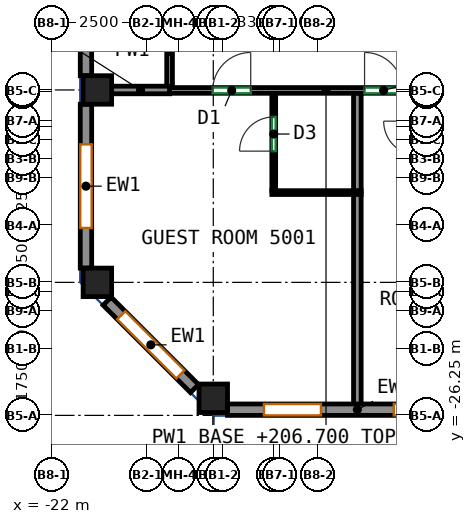
"""IFC4 building model, lengths in metres.
Left out: names, types, materials, properties, quantities, classifications, styles, units other than length and angle.
Written with IfcOpenShell. Run it as: python <this file> out.ifc"""

import sys

from ifc_helpers import new_model, si_unit, direction, frame, frame_2d, origin, origin_2d, place, context, subcontext, project, spatial, rectangle, extrude, source, transform, mapped, element, fill, save


model = new_model("IFC4")
c1 = context("Model", 3, precision=1e-05, world=origin(), true_north=direction((0.0, 1.0)))
c2 = subcontext(c1, "Body", "Model", "MODEL_VIEW")
j1 = project(units=[si_unit("LENGTHUNIT", "METRE"), si_unit("PLANEANGLEUNIT", "RADIAN")], contexts=[c1])
p1 = place(None, origin())
s1 = spatial("IfcSite", under=j1, at=p1, CompositionType="ELEMENT")
p2 = place(p1, origin())
s2 = spatial("IfcBuilding", under=s1, at=p2, CompositionType="ELEMENT")
p3 = place(p2, frame((0.0, 0.0, 206.7)))
s3 = spatial("IfcBuildingStorey", under=s2, at=p3, CompositionType="ELEMENT", Elevation=206.7)
m1 = source(origin(), c2, "Body", "SweptSolid", [
    extrude(rectangle(XDim=0.75, YDim=0.75, at=origin_2d()), origin(), (0.0, 0.0, 1.0), 3.12),
])
for number, where, z_axis, x_axis in (
    (1, (-20.8, -22.75, 0.0), (0.0, 0.0, 1.0), (1.0, 0.0, 0.0)),
    (2, (-20.8, -17.688, 0.0), (0.0, 0.0, 1.0), (1.0, 0.0, 0.0)),
    (3, (-17.75, -25.8, 0.0), (0.0, 0.0, 1.0), (1.0, 0.0, 0.0)),
):
    element("IfcColumn", number, at=place(p3, frame(where, z_axis=z_axis, x_axis=x_axis)), inside=s3, PredefinedType="COLUMN", context=c2, shape_type="MappedRepresentation", body=[
        mapped(m1, transform((0.0, 0.0, 0.0))),
    ])
m2 = source(origin(), c2, "Body", "SweptSolid", [
    extrude(rectangle(XDim=6.833, YDim=0.3, at=frame_2d((3.417, 0.0))), origin(), (0.0, 0.0, 1.0), 3.12),
])
p4 = place(p3, frame((-17.375, -26.1, 0.0), z_axis=(0.0, 0.0, 1.0), x_axis=(1.0, 0.0, 0.0)))
e4 = element("IfcWall", 4, at=p4, inside=s3, PredefinedType="SOLIDWALL", context=c2, shape_type="MappedRepresentation", body=[
    mapped(m2, transform((0.0, 0.0, 0.0))),
])
p5 = place(p4, frame((0.958, 0.0, 0.85)))
e5 = element("IfcOpeningElement", 5, at=p5, cuts=e4, PredefinedType="OPENING", context=c2, shape_type="SweptSolid", body=[
    extrude(rectangle(XDim=1.5, YDim=1.95, at=frame_2d((0.75, 0.975))), frame((0.0, 0.16, 0.0), z_axis=(0.0, -1.0, 0.0), x_axis=(1.0, 0.0, 0.0)), (0.0, 0.0, 1.0), 0.32),
])
p6 = place(p4, frame((4.375, 0.0, 0.85)))
e6 = element("IfcOpeningElement", 6, at=p6, cuts=e4, PredefinedType="OPENING", context=c2, shape_type="SweptSolid", body=[
    extrude(rectangle(XDim=1.5, YDim=1.95, at=frame_2d((0.75, 0.975))), frame((0.0, 0.16, 0.0), z_axis=(0.0, -1.0, 0.0), x_axis=(1.0, 0.0, 0.0)), (0.0, 0.0, 1.0), 0.32),
])
m3 = source(origin(), c2, "Body", "SweptSolid", [
    extrude(rectangle(XDim=7.812, YDim=0.3, at=frame_2d((3.906, 0.0))), origin(), (0.0, 0.0, 1.0), 3.12),
])
p7 = place(p3, frame((-21.1, -9.5, 0.0), z_axis=(0.0, 0.0, 1.0), x_axis=(0.0, -1.0, 0.0)))
e7 = element("IfcWall", 7, at=p7, inside=s3, PredefinedType="SOLIDWALL", context=c2, shape_type="MappedRepresentation", body=[
    mapped(m3, transform((0.0, 0.0, 0.0))),
])
p8 = place(p7, frame((0.853, 0.0, 0.85)))
e8 = element("IfcOpeningElement", 8, at=p8, cuts=e7, PredefinedType="OPENING", context=c2, shape_type="SweptSolid", body=[
    extrude(rectangle(XDim=2.2, YDim=1.95, at=frame_2d((1.1, 0.975))), frame((0.0, 0.16, 0.0), z_axis=(0.0, -1.0, 0.0), x_axis=(1.0, 0.0, 0.0)), (0.0, 0.0, 1.0), 0.32),
])
p9 = place(p7, frame((4.759, 0.0, 0.85)))
e9 = element("IfcOpeningElement", 9, at=p9, cuts=e7, PredefinedType="OPENING", context=c2, shape_type="SweptSolid", body=[
    extrude(rectangle(XDim=2.2, YDim=1.95, at=frame_2d((1.1, 0.975))), frame((0.0, 0.16, 0.0), z_axis=(0.0, -1.0, 0.0), x_axis=(1.0, 0.0, 0.0)), (0.0, 0.0, 1.0), 0.32),
])
m4 = source(origin(), c2, "Body", "SweptSolid", [
    extrude(rectangle(XDim=4.312, YDim=0.3, at=frame_2d((2.156, 0.0))), origin(), (0.0, 0.0, 1.0), 3.12),
])
p10 = place(p3, frame((-21.1, -18.062, 0.0), z_axis=(0.0, 0.0, 1.0), x_axis=(0.0, -1.0, 0.0)))
e10 = element("IfcWall", 10, at=p10, inside=s3, PredefinedType="SOLIDWALL", context=c2, shape_type="MappedRepresentation", body=[
    mapped(m4, transform((0.0, 0.0, 0.0))),
])
p11 = place(p10, frame((1.056, 0.0, 0.85)))
e11 = element("IfcOpeningElement", 11, at=p11, cuts=e10, PredefinedType="OPENING", context=c2, shape_type="SweptSolid", body=[
    extrude(rectangle(XDim=2.2, YDim=1.95, at=frame_2d((1.1, 0.975))), frame((0.0, 0.16, 0.0), z_axis=(0.0, -1.0, 0.0), x_axis=(1.0, 0.0, 0.0)), (0.0, 0.0, 1.0), 0.32),
])
m5 = source(origin(), c2, "Body", "SweptSolid", [
    extrude(rectangle(XDim=3.253, YDim=0.3, at=frame_2d((1.626, 0.0))), origin(), (0.0, 0.0, 1.0), 3.12),
])
p12 = place(p3, frame((-20.544, -23.244, 0.0), z_axis=(0.0, 0.0, 1.0), x_axis=(0.707106781187, -0.707106781187, 0.0)))
e12 = element("IfcWall", 12, at=p12, inside=s3, PredefinedType="SOLIDWALL", context=c2, shape_type="MappedRepresentation", body=[
    mapped(m5, transform((0.0, 0.0, 0.0))),
])
p13 = place(p12, frame((0.526, 0.0, 0.85)))
e13 = element("IfcOpeningElement", 13, at=p13, cuts=e12, PredefinedType="OPENING", context=c2, shape_type="SweptSolid", body=[
    extrude(rectangle(XDim=2.2, YDim=1.95, at=frame_2d((1.1, 0.975))), frame((0.0, 0.16, 0.0), z_axis=(0.0, -1.0, 0.0), x_axis=(1.0, 0.0, 0.0)), (0.0, 0.0, 1.0), 0.32),
])
p14 = place(p3, frame((-18.9, -17.7, 0.0), z_axis=(0.0, 0.0, 1.0), x_axis=(1.0, 0.0, 0.0)))
e14 = element("IfcWall", 14, at=p14, inside=s3, PredefinedType="PARTITIONING", context=c2, shape_type="SweptSolid", body=[
    extrude(rectangle(XDim=8.233, YDim=0.15, at=frame_2d((4.116, 0.0))), origin(), (0.0, 0.0, 1.0), 2.52),
])
p15 = place(p14, frame((1.135, 0.0, 0.0)))
e15 = element("IfcOpeningElement", 15, at=p15, cuts=e14, PredefinedType="OPENING", context=c2, shape_type="SweptSolid", body=[
    extrude(rectangle(XDim=1.0, YDim=2.1, at=frame_2d((0.5, 1.05))), frame((0.0, 0.085, 0.0), z_axis=(0.0, -1.0, 0.0), x_axis=(1.0, 0.0, 0.0)), (0.0, 0.0, 1.0), 0.17),
])
p16 = place(p14, frame((5.131, 0.0, 0.0)))
e16 = element("IfcOpeningElement", 16, at=p16, cuts=e14, PredefinedType="OPENING", context=c2, shape_type="SweptSolid", body=[
    extrude(rectangle(XDim=1.0, YDim=2.1, at=frame_2d((0.5, 1.05))), frame((0.0, 0.085, 0.0), z_axis=(0.0, -1.0, 0.0), x_axis=(1.0, 0.0, 0.0)), (0.0, 0.0, 1.0), 0.17),
])
p17 = place(p3, frame((-18.9, -17.598, 0.0), z_axis=(0.0, 0.0, 1.0), x_axis=(0.0, 1.0, 0.0)))
e17 = element("IfcWall", 17, at=p17, inside=s3, PredefinedType="PARTITIONING", context=c2, shape_type="SweptSolid", body=[
    extrude(rectangle(XDim=1.855, YDim=0.15, at=frame_2d((0.927, 0.0))), origin(), (0.0, 0.0, 1.0), 3.12),
])
p18 = place(p3, frame((-16.159, -20.338, 0.0), z_axis=(0.0, 0.0, 1.0), x_axis=(0.0, 1.0, 0.0)))
e18 = element("IfcWall", 18, at=p18, inside=s3, PredefinedType="PARTITIONING", context=c2, shape_type="SweptSolid", body=[
    extrude(rectangle(XDim=2.561, YDim=0.1, at=frame_2d((1.28, 0.0))), origin(), (0.0, 0.0, 1.0), 3.12),
])
p19 = place(p18, frame((1.041, 0.0, 0.0)))
e19 = element("IfcOpeningElement", 19, at=p19, cuts=e18, PredefinedType="OPENING", context=c2, shape_type="SweptSolid", body=[
    extrude(rectangle(XDim=0.9, YDim=2.1, at=frame_2d((0.45, 1.05))), frame((0.0, 0.06, 0.0), z_axis=(0.0, -1.0, 0.0), x_axis=(1.0, 0.0, 0.0)), (0.0, 0.0, 1.0), 0.12),
])
p20 = place(p3, frame((-16.209, -20.388, 0.0), z_axis=(0.0, 0.0, 1.0), x_axis=(1.0, 0.0, 0.0)))
e20 = element("IfcWall", 20, at=p20, inside=s3, PredefinedType="PARTITIONING", context=c2, shape_type="SweptSolid", body=[
    extrude(rectangle(XDim=2.35, YDim=0.1, at=frame_2d((1.175, 0.0))), origin(), (0.0, 0.0, 1.0), 3.12),
])
p21 = place(p3, frame((-13.959, -26.0, 0.0), z_axis=(0.0, 0.0, 1.0), x_axis=(0.0, 1.0, 0.0)))
e21 = element("IfcWall", 21, at=p21, inside=s3, PredefinedType="PARTITIONING", context=c2, shape_type="SweptSolid", body=[
    extrude(rectangle(XDim=5.562, YDim=0.2, at=frame_2d((2.781, 0.0))), origin(), (0.0, 0.0, 1.0), 3.12),
])
p22 = place(p3, frame((-20.425, -17.688, 0.0), z_axis=(0.0, 0.0, 1.0), x_axis=(1.0, 0.0, 0.0)))
e22 = element("IfcWall", 22, at=p22, inside=s3, PredefinedType="PARTITIONING", context=c2, shape_type="SweptSolid", body=[
    extrude(rectangle(XDim=1.523, YDim=0.2, at=frame_2d((0.761, 0.0))), origin(), (0.0, 0.0, 1.0), 2.52),
])
p23 = place(p3, frame((-13.959, -20.338, 0.0), z_axis=(0.0, 0.0, 1.0), x_axis=(0.0, 1.0, 0.0)))
e23 = element("IfcWall", 23, at=p23, inside=s3, PredefinedType="PARTITIONING", context=c2, shape_type="SweptSolid", body=[
    extrude(rectangle(XDim=2.561, YDim=0.2, at=frame_2d((1.28, 0.0))), origin(), (0.0, 0.0, 1.0), 3.12),
])
p24 = place(p5, origin())
e24 = element("IfcWindow", 24, at=p24, inside=s3, PartitioningType="SINGLE_PANEL", PredefinedType="WINDOW", context=c2, shape_type="SweptSolid", body=[
    extrude(rectangle(XDim=1.5, YDim=1.95, at=frame_2d((0.75, 0.975))), frame((0.0, 0.03, 0.0), z_axis=(0.0, -1.0, 0.0), x_axis=(1.0, 0.0, 0.0)), (0.0, 0.0, 1.0), 0.06),
])
fill(e5, e24)
p25 = place(p6, origin())
e25 = element("IfcWindow", 25, at=p25, inside=s3, PartitioningType="SINGLE_PANEL", PredefinedType="WINDOW", context=c2, shape_type="SweptSolid", body=[
    extrude(rectangle(XDim=1.5, YDim=1.95, at=frame_2d((0.75, 0.975))), frame((0.0, 0.03, 0.0), z_axis=(0.0, -1.0, 0.0), x_axis=(1.0, 0.0, 0.0)), (0.0, 0.0, 1.0), 0.06),
])
fill(e6, e25)
p26 = place(p11, origin())
e26 = element("IfcWindow", 26, at=p26, inside=s3, PartitioningType="SINGLE_PANEL", PredefinedType="WINDOW", context=c2, shape_type="SweptSolid", body=[
    extrude(rectangle(XDim=2.2, YDim=1.95, at=frame_2d((1.1, 0.975))), frame((0.0, 0.03, 0.0), z_axis=(0.0, -1.0, 0.0), x_axis=(1.0, 0.0, 0.0)), (0.0, 0.0, 1.0), 0.06),
])
fill(e11, e26)
p27 = place(p13, origin())
e27 = element("IfcWindow", 27, at=p27, inside=s3, PartitioningType="SINGLE_PANEL", PredefinedType="WINDOW", context=c2, shape_type="SweptSolid", body=[
    extrude(rectangle(XDim=2.2, YDim=1.95, at=frame_2d((1.1, 0.975))), frame((0.0, 0.03, 0.0), z_axis=(0.0, -1.0, 0.0), x_axis=(1.0, 0.0, 0.0)), (0.0, 0.0, 1.0), 0.06),
])
fill(e13, e27)
p28 = place(p19, origin())
e28 = element("IfcDoor", 28, at=p28, inside=s3, OperationType="SINGLE_SWING_LEFT", PredefinedType="DOOR", context=c2, shape_type="SweptSolid", body=[
    extrude(rectangle(XDim=0.9, YDim=2.1, at=frame_2d((0.45, 1.05))), frame((0.0, 0.025, 0.0), z_axis=(0.0, -1.0, 0.0), x_axis=(1.0, 0.0, 0.0)), (0.0, 0.0, 1.0), 0.05),
])
fill(e19, e28)
p29 = place(p15, origin())
e29 = element("IfcDoor", 29, at=p29, inside=s3, OperationType="SINGLE_SWING_RIGHT", PredefinedType="DOOR", context=c2, shape_type="SweptSolid", body=[
    extrude(rectangle(XDim=1.0, YDim=2.1, at=frame_2d((0.5, 1.05))), frame((0.0, 0.025, 0.0), z_axis=(0.0, -1.0, 0.0), x_axis=(1.0, 0.0, 0.0)), (0.0, 0.0, 1.0), 0.05),
])
fill(e15, e29)
p30 = place(p16, origin())
e30 = element("IfcDoor", 30, at=p30, inside=s3, OperationType="SINGLE_SWING_LEFT", PredefinedType="DOOR", context=c2, shape_type="SweptSolid", body=[
    extrude(rectangle(XDim=1.0, YDim=2.1, at=frame_2d((0.5, 1.05))), frame((0.0, 0.025, 0.0), z_axis=(0.0, -1.0, 0.0), x_axis=(1.0, 0.0, 0.0)), (0.0, 0.0, 1.0), 0.05),
])
fill(e16, e30)
save(model, sys.argv[1])
